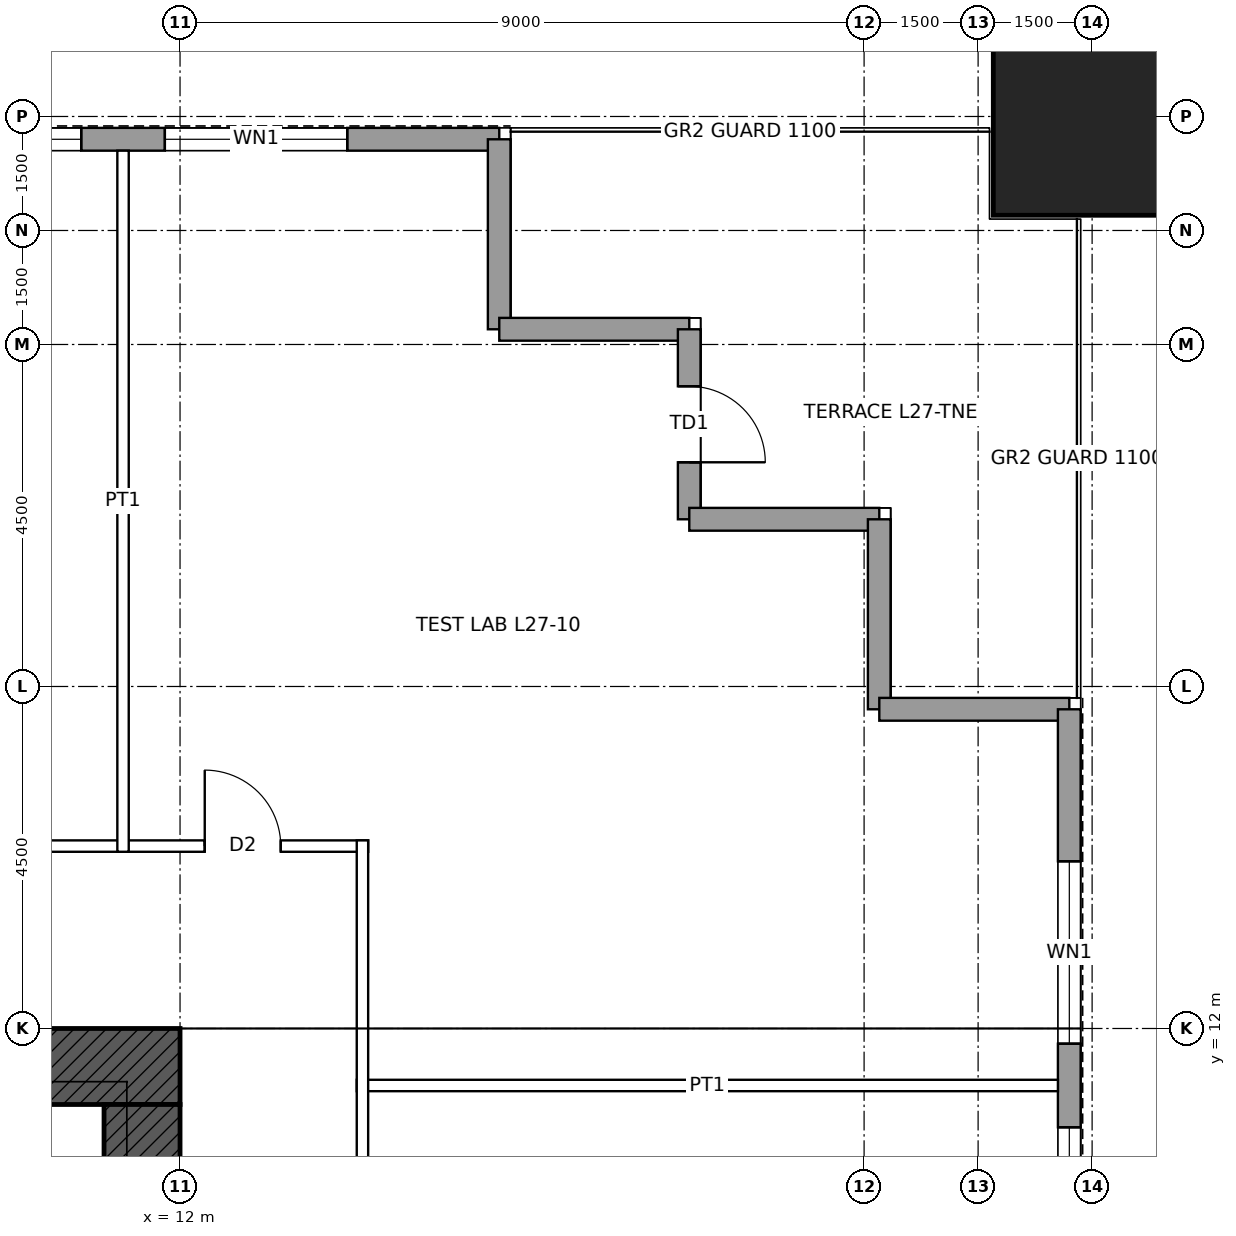
"""IFC4 building model, lengths in metres.
Left out: names, types, materials, properties, quantities, classifications, styles, units other than length and angle.
Written with IfcOpenShell. Run it as: python <this file> out.ifc"""

import sys

from ifc_helpers import new_model, si_unit, direction, frame, frame_2d, origin, origin_2d, place, context, subcontext, project, spatial, rectangle, hollow_rectangle, extrude, element, fill, save


model = new_model("IFC4")
c1 = context("Model", 3, precision=1e-05, world=origin(), true_north=direction((0.0, 1.0)))
c2 = subcontext(c1, "Body", "Model", "MODEL_VIEW")
j1 = project(units=[si_unit("LENGTHUNIT", "METRE"), si_unit("PLANEANGLEUNIT", "RADIAN")], contexts=[c1])
p1 = place(None, origin())
s1 = spatial("IfcSite", under=j1, at=p1, CompositionType="ELEMENT")
p2 = place(p1, origin())
s2 = spatial("IfcBuilding", under=s1, at=p2, CompositionType="ELEMENT")
p3 = place(p2, frame((0.0, 0.0, 135.9)))
s3 = spatial("IfcBuildingStorey", under=s2, at=p3, CompositionType="ELEMENT", Elevation=135.9)
p4 = place(p3, frame((24.0, 24.0, 0.0), z_axis=(0.0, 0.0, 1.0), x_axis=(1.0, 0.0, 0.0)))
e1 = element("IfcColumn", 1, at=p4, inside=s3, PredefinedType="COLUMN", context=c2, shape_type="SweptSolid", body=[
    extrude(hollow_rectangle(XDim=2.6, YDim=2.6, WallThickness=0.13, at=origin_2d()), origin(), (0.0, 0.0, 1.0), 4.5),
])
p5 = place(p3, frame((-12.0, 11.5, 0.0), z_axis=(0.0, 0.0, 1.0), x_axis=(1.0, 0.0, 0.0)))
e2 = element("IfcWall", 2, at=p5, inside=s3, PredefinedType="SHEAR", context=c2, shape_type="SweptSolid", body=[
    extrude(rectangle(XDim=24.0, YDim=1.0, at=frame_2d((12.0, 0.0))), origin(), (0.0, 0.0, 1.0), 4.5),
])
p6 = place(p5, frame((6.25, 0.0, 0.0)))
e3 = element("IfcOpeningElement", 3, at=p6, cuts=e2, PredefinedType="OPENING", context=c2, shape_type="SweptSolid", body=[
    extrude(rectangle(XDim=1.0, YDim=2.4, at=frame_2d((0.5, 1.2))), frame((0.0, 0.51, 0.0), z_axis=(0.0, -1.0, 0.0), x_axis=(1.0, 0.0, 0.0)), (0.0, 0.0, 1.0), 1.02),
])
p7 = place(p5, frame((16.75, 0.0, 0.0)))
e4 = element("IfcOpeningElement", 4, at=p7, cuts=e2, PredefinedType="OPENING", context=c2, shape_type="SweptSolid", body=[
    extrude(rectangle(XDim=1.0, YDim=2.4, at=frame_2d((0.5, 1.2))), frame((0.0, 0.51, 0.0), z_axis=(0.0, -1.0, 0.0), x_axis=(1.0, 0.0, 0.0)), (0.0, 0.0, 1.0), 1.02),
])
p8 = place(p3, frame((11.5, 11.0, 0.0), z_axis=(0.0, 0.0, 1.0), x_axis=(0.0, -1.0, 0.0)))
e5 = element("IfcWall", 5, at=p8, inside=s3, PredefinedType="SHEAR", context=c2, shape_type="SweptSolid", body=[
    extrude(rectangle(XDim=22.0, YDim=1.0, at=frame_2d((11.0, 0.0))), origin(), (0.0, 0.0, 1.0), 4.5),
])
p9 = place(p8, frame((10.5, 0.0, 0.0)))
e6 = element("IfcOpeningElement", 6, at=p9, cuts=e5, PredefinedType="OPENING", context=c2, shape_type="SweptSolid", body=[
    extrude(rectangle(XDim=1.0, YDim=2.4, at=frame_2d((0.5, 1.2))), frame((0.0, 0.51, 0.0), z_axis=(0.0, -1.0, 0.0), x_axis=(1.0, 0.0, 0.0)), (0.0, 0.0, 1.0), 1.02),
])
p10 = place(p3, frame((-16.2, 23.7, 0.0), z_axis=(0.0, 0.0, 1.0), x_axis=(1.0, 0.0, 0.0)))
e7 = element("IfcWall", 7, at=p10, inside=s3, PredefinedType="SOLIDWALL", context=c2, shape_type="SweptSolid", body=[
    extrude(rectangle(XDim=32.4, YDim=0.3, at=frame_2d((16.2, 0.0))), origin(), (0.0, 0.0, 1.0), 4.3),
])
p11 = place(p10, frame((2.0, 0.0, 1.0)))
e8 = element("IfcOpeningElement", 8, at=p11, cuts=e7, PredefinedType="OPENING", context=c2, shape_type="SweptSolid", body=[
    extrude(rectangle(XDim=2.4, YDim=1.2, at=frame_2d((1.2, 0.6))), frame((0.0, 0.16, 0.0), z_axis=(0.0, -1.0, 0.0), x_axis=(1.0, 0.0, 0.0)), (0.0, 0.0, 1.0), 0.32),
])
p12 = place(p10, frame((5.5, 0.0, 1.0)))
e9 = element("IfcOpeningElement", 9, at=p12, cuts=e7, PredefinedType="OPENING", context=c2, shape_type="SweptSolid", body=[
    extrude(rectangle(XDim=2.4, YDim=1.2, at=frame_2d((1.2, 0.6))), frame((0.0, 0.16, 0.0), z_axis=(0.0, -1.0, 0.0), x_axis=(1.0, 0.0, 0.0)), (0.0, 0.0, 1.0), 0.32),
])
p13 = place(p10, frame((9.5, 0.0, 1.0)))
e10 = element("IfcOpeningElement", 10, at=p13, cuts=e7, PredefinedType="OPENING", context=c2, shape_type="SweptSolid", body=[
    extrude(rectangle(XDim=2.4, YDim=1.2, at=frame_2d((1.2, 0.6))), frame((0.0, 0.16, 0.0), z_axis=(0.0, -1.0, 0.0), x_axis=(1.0, 0.0, 0.0)), (0.0, 0.0, 1.0), 0.32),
])
p14 = place(p10, frame((13.0, 0.0, 1.0)))
e11 = element("IfcOpeningElement", 11, at=p14, cuts=e7, PredefinedType="OPENING", context=c2, shape_type="SweptSolid", body=[
    extrude(rectangle(XDim=2.4, YDim=1.2, at=frame_2d((1.2, 0.6))), frame((0.0, 0.16, 0.0), z_axis=(0.0, -1.0, 0.0), x_axis=(1.0, 0.0, 0.0)), (0.0, 0.0, 1.0), 0.32),
])
p15 = place(p10, frame((17.0, 0.0, 1.0)))
e12 = element("IfcOpeningElement", 12, at=p15, cuts=e7, PredefinedType="OPENING", context=c2, shape_type="SweptSolid", body=[
    extrude(rectangle(XDim=2.4, YDim=1.2, at=frame_2d((1.2, 0.6))), frame((0.0, 0.16, 0.0), z_axis=(0.0, -1.0, 0.0), x_axis=(1.0, 0.0, 0.0)), (0.0, 0.0, 1.0), 0.32),
])
p16 = place(p10, frame((20.5, 0.0, 1.0)))
e13 = element("IfcOpeningElement", 13, at=p16, cuts=e7, PredefinedType="OPENING", context=c2, shape_type="SweptSolid", body=[
    extrude(rectangle(XDim=2.4, YDim=1.2, at=frame_2d((1.2, 0.6))), frame((0.0, 0.16, 0.0), z_axis=(0.0, -1.0, 0.0), x_axis=(1.0, 0.0, 0.0)), (0.0, 0.0, 1.0), 0.32),
])
p17 = place(p10, frame((24.5, 0.0, 1.0)))
e14 = element("IfcOpeningElement", 14, at=p17, cuts=e7, PredefinedType="OPENING", context=c2, shape_type="SweptSolid", body=[
    extrude(rectangle(XDim=2.4, YDim=1.2, at=frame_2d((1.2, 0.6))), frame((0.0, 0.16, 0.0), z_axis=(0.0, -1.0, 0.0), x_axis=(1.0, 0.0, 0.0)), (0.0, 0.0, 1.0), 0.32),
])
p18 = place(p10, frame((28.0, 0.0, 1.0)))
e15 = element("IfcOpeningElement", 15, at=p18, cuts=e7, PredefinedType="OPENING", context=c2, shape_type="SweptSolid", body=[
    extrude(rectangle(XDim=2.4, YDim=1.2, at=frame_2d((1.2, 0.6))), frame((0.0, 0.16, 0.0), z_axis=(0.0, -1.0, 0.0), x_axis=(1.0, 0.0, 0.0)), (0.0, 0.0, 1.0), 0.32),
])
for number, where, z_axis, x_axis in (
    (16, (16.2, 23.7, 0.0), (0.0, 0.0, 1.0), (0.0, -1.0, 0.0)),
    (17, (16.2, 21.2, 0.0), (0.0, 0.0, 1.0), (1.0, 0.0, 0.0)),
):
    element("IfcWall", number, at=place(p3, frame(where, z_axis=z_axis, x_axis=x_axis)), inside=s3, PredefinedType="SOLIDWALL", context=c2, shape_type="SweptSolid", body=[
        extrude(rectangle(XDim=2.5, YDim=0.3, at=frame_2d((1.25, 0.0))), origin(), (0.0, 0.0, 1.0), 4.3),
    ])
p19 = place(p3, frame((18.7, 21.2, 0.0), z_axis=(0.0, 0.0, 1.0), x_axis=(0.0, -1.0, 0.0)))
e18 = element("IfcWall", 18, at=p19, inside=s3, PredefinedType="SOLIDWALL", context=c2, shape_type="SweptSolid", body=[
    extrude(rectangle(XDim=2.5, YDim=0.3, at=frame_2d((1.25, 0.0))), origin(), (0.0, 0.0, 1.0), 4.3),
])
p20 = place(p19, frame((0.75, 0.0, 0.0)))
e19 = element("IfcOpeningElement", 19, at=p20, cuts=e18, PredefinedType="OPENING", context=c2, shape_type="SweptSolid", body=[
    extrude(rectangle(XDim=1.0, YDim=2.4, at=frame_2d((0.5, 1.2))), frame((0.0, 0.16, 0.0), z_axis=(0.0, -1.0, 0.0), x_axis=(1.0, 0.0, 0.0)), (0.0, 0.0, 1.0), 0.32),
])
for number, where, z_axis, x_axis in (
    (20, (18.7, 18.7, 0.0), (0.0, 0.0, 1.0), (1.0, 0.0, 0.0)),
    (21, (21.2, 18.7, 0.0), (0.0, 0.0, 1.0), (0.0, -1.0, 0.0)),
    (22, (21.2, 16.2, 0.0), (0.0, 0.0, 1.0), (1.0, 0.0, 0.0)),
):
    element("IfcWall", number, at=place(p3, frame(where, z_axis=z_axis, x_axis=x_axis)), inside=s3, PredefinedType="SOLIDWALL", context=c2, shape_type="SweptSolid", body=[
        extrude(rectangle(XDim=2.5, YDim=0.3, at=frame_2d((1.25, 0.0))), origin(), (0.0, 0.0, 1.0), 4.3),
    ])
p21 = place(p3, frame((23.7, 16.2, 0.0), z_axis=(0.0, 0.0, 1.0), x_axis=(0.0, -1.0, 0.0)))
e23 = element("IfcWall", 23, at=p21, inside=s3, PredefinedType="SOLIDWALL", context=c2, shape_type="SweptSolid", body=[
    extrude(rectangle(XDim=32.4, YDim=0.3, at=frame_2d((16.2, 0.0))), origin(), (0.0, 0.0, 1.0), 4.3),
])
p22 = place(p21, frame((2.0, 0.0, 1.0)))
e24 = element("IfcOpeningElement", 24, at=p22, cuts=e23, PredefinedType="OPENING", context=c2, shape_type="SweptSolid", body=[
    extrude(rectangle(XDim=2.4, YDim=1.2, at=frame_2d((1.2, 0.6))), frame((0.0, 0.16, 0.0), z_axis=(0.0, -1.0, 0.0), x_axis=(1.0, 0.0, 0.0)), (0.0, 0.0, 1.0), 0.32),
])
p23 = place(p21, frame((5.5, 0.0, 1.0)))
e25 = element("IfcOpeningElement", 25, at=p23, cuts=e23, PredefinedType="OPENING", context=c2, shape_type="SweptSolid", body=[
    extrude(rectangle(XDim=2.4, YDim=1.2, at=frame_2d((1.2, 0.6))), frame((0.0, 0.16, 0.0), z_axis=(0.0, -1.0, 0.0), x_axis=(1.0, 0.0, 0.0)), (0.0, 0.0, 1.0), 0.32),
])
p24 = place(p21, frame((9.5, 0.0, 1.0)))
e26 = element("IfcOpeningElement", 26, at=p24, cuts=e23, PredefinedType="OPENING", context=c2, shape_type="SweptSolid", body=[
    extrude(rectangle(XDim=2.4, YDim=1.2, at=frame_2d((1.2, 0.6))), frame((0.0, 0.16, 0.0), z_axis=(0.0, -1.0, 0.0), x_axis=(1.0, 0.0, 0.0)), (0.0, 0.0, 1.0), 0.32),
])
p25 = place(p21, frame((13.0, 0.0, 1.0)))
e27 = element("IfcOpeningElement", 27, at=p25, cuts=e23, PredefinedType="OPENING", context=c2, shape_type="SweptSolid", body=[
    extrude(rectangle(XDim=2.4, YDim=1.2, at=frame_2d((1.2, 0.6))), frame((0.0, 0.16, 0.0), z_axis=(0.0, -1.0, 0.0), x_axis=(1.0, 0.0, 0.0)), (0.0, 0.0, 1.0), 0.32),
])
p26 = place(p21, frame((17.0, 0.0, 1.0)))
e28 = element("IfcOpeningElement", 28, at=p26, cuts=e23, PredefinedType="OPENING", context=c2, shape_type="SweptSolid", body=[
    extrude(rectangle(XDim=2.4, YDim=1.2, at=frame_2d((1.2, 0.6))), frame((0.0, 0.16, 0.0), z_axis=(0.0, -1.0, 0.0), x_axis=(1.0, 0.0, 0.0)), (0.0, 0.0, 1.0), 0.32),
])
p27 = place(p21, frame((20.5, 0.0, 1.0)))
e29 = element("IfcOpeningElement", 29, at=p27, cuts=e23, PredefinedType="OPENING", context=c2, shape_type="SweptSolid", body=[
    extrude(rectangle(XDim=2.4, YDim=1.2, at=frame_2d((1.2, 0.6))), frame((0.0, 0.16, 0.0), z_axis=(0.0, -1.0, 0.0), x_axis=(1.0, 0.0, 0.0)), (0.0, 0.0, 1.0), 0.32),
])
p28 = place(p21, frame((24.5, 0.0, 1.0)))
e30 = element("IfcOpeningElement", 30, at=p28, cuts=e23, PredefinedType="OPENING", context=c2, shape_type="SweptSolid", body=[
    extrude(rectangle(XDim=2.4, YDim=1.2, at=frame_2d((1.2, 0.6))), frame((0.0, 0.16, 0.0), z_axis=(0.0, -1.0, 0.0), x_axis=(1.0, 0.0, 0.0)), (0.0, 0.0, 1.0), 0.32),
])
p29 = place(p21, frame((28.0, 0.0, 1.0)))
e31 = element("IfcOpeningElement", 31, at=p29, cuts=e23, PredefinedType="OPENING", context=c2, shape_type="SweptSolid", body=[
    extrude(rectangle(XDim=2.4, YDim=1.2, at=frame_2d((1.2, 0.6))), frame((0.0, 0.16, 0.0), z_axis=(0.0, -1.0, 0.0), x_axis=(1.0, 0.0, 0.0)), (0.0, 0.0, 1.0), 0.32),
])
p30 = place(p3, frame((14.325, 11.25, 0.0), z_axis=(0.0, 0.0, 1.0), x_axis=(1.0, 0.0, 0.0)))
e32 = element("IfcWall", 32, at=p30, inside=s3, PredefinedType="PARTITIONING", context=c2, shape_type="SweptSolid", body=[
    extrude(rectangle(XDim=9.225, YDim=0.15, at=frame_2d((4.613, 0.0))), origin(), (0.0, 0.0, 1.0), 3.431),
])
p31 = place(p3, frame((-14.475, 14.4, 0.0), z_axis=(0.0, 0.0, 1.0), x_axis=(1.0, 0.0, 0.0)))
e33 = element("IfcWall", 33, at=p31, inside=s3, PredefinedType="PARTITIONING", context=c2, shape_type="SweptSolid", body=[
    extrude(rectangle(XDim=28.95, YDim=0.15, at=frame_2d((14.475, 0.0))), origin(), (0.0, 0.0, 1.0), 4.3),
])
p32 = place(p31, frame((13.575, 0.0, 0.0)))
e34 = element("IfcOpeningElement", 34, at=p32, cuts=e33, PredefinedType="OPENING", context=c2, shape_type="SweptSolid", body=[
    extrude(rectangle(XDim=1.8, YDim=2.4, at=frame_2d((0.9, 1.2))), frame((0.0, 0.085, 0.0), z_axis=(0.0, -1.0, 0.0), x_axis=(1.0, 0.0, 0.0)), (0.0, 0.0, 1.0), 0.17),
])
p33 = place(p31, frame((26.8, 0.0, 0.0)))
e35 = element("IfcOpeningElement", 35, at=p33, cuts=e33, PredefinedType="OPENING", context=c2, shape_type="SweptSolid", body=[
    extrude(rectangle(XDim=1.0, YDim=2.1, at=frame_2d((0.5, 1.05))), frame((0.0, 0.085, 0.0), z_axis=(0.0, -1.0, 0.0), x_axis=(1.0, 0.0, 0.0)), (0.0, 0.0, 1.0), 0.17),
])
p34 = place(p31, frame((1.15, 0.0, 0.0)))
e36 = element("IfcOpeningElement", 36, at=p34, cuts=e33, PredefinedType="OPENING", context=c2, shape_type="SweptSolid", body=[
    extrude(rectangle(XDim=1.0, YDim=2.1, at=frame_2d((0.5, 1.05))), frame((0.0, 0.085, 0.0), z_axis=(0.0, -1.0, 0.0), x_axis=(1.0, 0.0, 0.0)), (0.0, 0.0, 1.0), 0.17),
])
p35 = place(p3, frame((11.25, 14.325, 0.0), z_axis=(0.0, 0.0, 1.0), x_axis=(0.0, 1.0, 0.0)))
e37 = element("IfcWall", 37, at=p35, inside=s3, PredefinedType="PARTITIONING", context=c2, shape_type="SweptSolid", body=[
    extrude(rectangle(XDim=9.225, YDim=0.15, at=frame_2d((4.613, 0.0))), origin(), (0.0, 0.0, 1.0), 3.431),
])
p36 = place(p3, frame((14.4, -14.475, 0.0), z_axis=(0.0, 0.0, 1.0), x_axis=(0.0, 1.0, 0.0)))
e38 = element("IfcWall", 38, at=p36, inside=s3, PredefinedType="PARTITIONING", context=c2, shape_type="SweptSolid", body=[
    extrude(rectangle(XDim=28.95, YDim=0.15, at=frame_2d((14.475, 0.0))), origin(), (0.0, 0.0, 1.0), 4.3),
])
p37 = place(p36, frame((17.325, 0.0, 0.0)))
e39 = element("IfcOpeningElement", 39, at=p37, cuts=e38, PredefinedType="OPENING", context=c2, shape_type="SweptSolid", body=[
    extrude(rectangle(XDim=1.8, YDim=2.4, at=frame_2d((0.9, 1.2))), frame((0.0, 0.085, 0.0), z_axis=(0.0, -1.0, 0.0), x_axis=(1.0, 0.0, 0.0)), (0.0, 0.0, 1.0), 0.17),
])
p38 = place(p36, frame((6.075, 0.0, 0.0)))
e40 = element("IfcOpeningElement", 40, at=p38, cuts=e38, PredefinedType="OPENING", context=c2, shape_type="SweptSolid", body=[
    extrude(rectangle(XDim=1.8, YDim=2.4, at=frame_2d((0.9, 1.2))), frame((0.0, 0.085, 0.0), z_axis=(0.0, -1.0, 0.0), x_axis=(1.0, 0.0, 0.0)), (0.0, 0.0, 1.0), 0.17),
])
p39 = place(p17, origin())
e41 = element("IfcWindow", 41, at=p39, inside=s3, PartitioningType="SINGLE_PANEL", PredefinedType="WINDOW", context=c2, shape_type="SweptSolid", body=[
    extrude(rectangle(XDim=2.4, YDim=1.2, at=frame_2d((1.2, 0.6))), frame((0.0, 0.03, 0.0), z_axis=(0.0, -1.0, 0.0), x_axis=(1.0, 0.0, 0.0)), (0.0, 0.0, 1.0), 0.06),
])
fill(e14, e41)
p40 = place(p18, origin())
e42 = element("IfcWindow", 42, at=p40, inside=s3, PartitioningType="SINGLE_PANEL", PredefinedType="WINDOW", context=c2, shape_type="SweptSolid", body=[
    extrude(rectangle(XDim=2.4, YDim=1.2, at=frame_2d((1.2, 0.6))), frame((0.0, 0.03, 0.0), z_axis=(0.0, -1.0, 0.0), x_axis=(1.0, 0.0, 0.0)), (0.0, 0.0, 1.0), 0.06),
])
fill(e15, e42)
p41 = place(p20, origin())
e43 = element("IfcDoor", 43, at=p41, inside=s3, OperationType="SINGLE_SWING_RIGHT", PredefinedType="DOOR", context=c2, shape_type="SweptSolid", body=[
    extrude(rectangle(XDim=1.0, YDim=2.4, at=frame_2d((0.5, 1.2))), frame((0.0, 0.025, 0.0), z_axis=(0.0, -1.0, 0.0), x_axis=(1.0, 0.0, 0.0)), (0.0, 0.0, 1.0), 0.05),
])
fill(e19, e43)
p42 = place(p22, origin())
e44 = element("IfcWindow", 44, at=p42, inside=s3, PartitioningType="SINGLE_PANEL", PredefinedType="WINDOW", context=c2, shape_type="SweptSolid", body=[
    extrude(rectangle(XDim=2.4, YDim=1.2, at=frame_2d((1.2, 0.6))), frame((0.0, 0.03, 0.0), z_axis=(0.0, -1.0, 0.0), x_axis=(1.0, 0.0, 0.0)), (0.0, 0.0, 1.0), 0.06),
])
fill(e24, e44)
p43 = place(p23, origin())
e45 = element("IfcWindow", 45, at=p43, inside=s3, PartitioningType="SINGLE_PANEL", PredefinedType="WINDOW", context=c2, shape_type="SweptSolid", body=[
    extrude(rectangle(XDim=2.4, YDim=1.2, at=frame_2d((1.2, 0.6))), frame((0.0, 0.03, 0.0), z_axis=(0.0, -1.0, 0.0), x_axis=(1.0, 0.0, 0.0)), (0.0, 0.0, 1.0), 0.06),
])
fill(e25, e45)
p44 = place(p33, origin())
e46 = element("IfcDoor", 46, at=p44, inside=s3, OperationType="SINGLE_SWING_LEFT", PredefinedType="DOOR", context=c2, shape_type="SweptSolid", body=[
    extrude(rectangle(XDim=1.0, YDim=2.1, at=frame_2d((0.5, 1.05))), frame((0.0, 0.025, 0.0), z_axis=(0.0, -1.0, 0.0), x_axis=(1.0, 0.0, 0.0)), (0.0, 0.0, 1.0), 0.05),
])
fill(e35, e46)
save(model, sys.argv[1])
